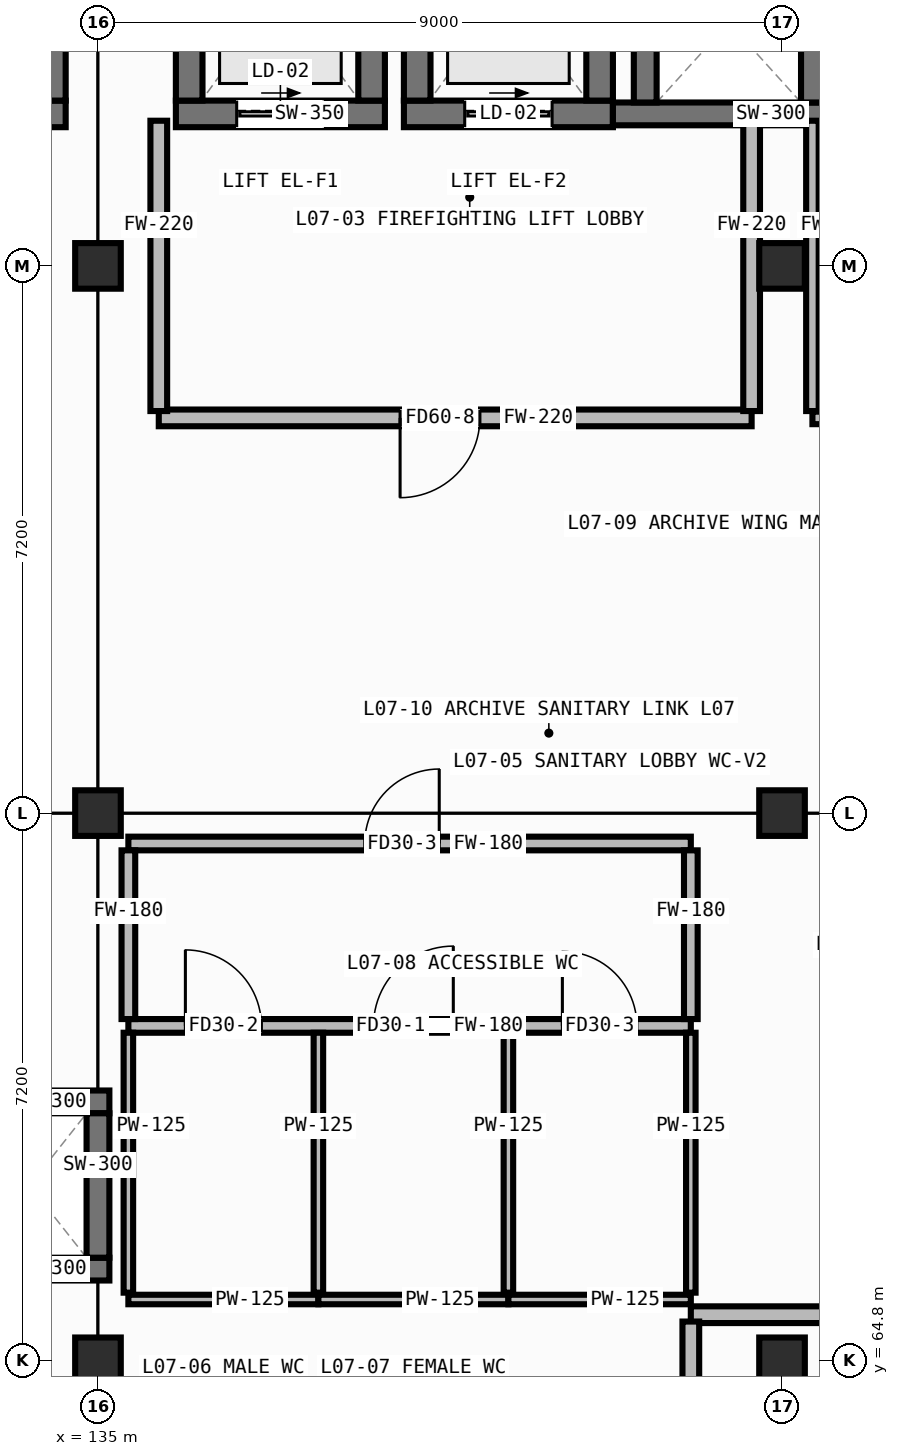
"""IFC4 building model, lengths in metres.
Left out: names, types, materials, properties, quantities, classifications, styles, units other than length and angle.
Written with IfcOpenShell. Run it as: python <this file> out.ifc"""

import sys

from ifc_helpers import new_model, si_unit, direction, frame, frame_2d, origin, origin_2d, place, context, subcontext, project, spatial, rectangle, hollow_rectangle, extrude, element, fill, save


model = new_model("IFC4")
c1 = context("Model", 3, precision=1e-05, world=origin(), true_north=direction((0.0, 1.0)))
c2 = subcontext(c1, "Body", "Model", "MODEL_VIEW")
j1 = project(units=[si_unit("LENGTHUNIT", "METRE"), si_unit("PLANEANGLEUNIT", "RADIAN")], contexts=[c1])
p1 = place(None, origin())
s1 = spatial("IfcSite", under=j1, at=p1, CompositionType="ELEMENT")
p2 = place(p1, origin())
s2 = spatial("IfcBuilding", under=s1, at=p2, CompositionType="ELEMENT")
p3 = place(p2, frame((0.0, 0.0, 24.2)))
s3 = spatial("IfcBuildingStorey", under=s2, at=p3, CompositionType="ELEMENT", Elevation=24.2)
for number, where, z_axis, x_axis in (
    (1, (135.0, 64.8, 0.0), (0.0, 0.0, 1.0), (1.0, 0.0, 0.0)),
    (2, (135.0, 72.0, 0.0), (0.0, 0.0, 1.0), (1.0, 0.0, 0.0)),
    (3, (135.0, 79.2, 0.0), (0.0, 0.0, 1.0), (1.0, 0.0, 0.0)),
    (4, (144.0, 64.8, 0.0), (0.0, 0.0, 1.0), (1.0, 0.0, 0.0)),
    (5, (144.0, 72.0, 0.0), (0.0, 0.0, 1.0), (1.0, 0.0, 0.0)),
    (6, (144.0, 79.2, 0.0), (0.0, 0.0, 1.0), (1.0, 0.0, 0.0)),
):
    element("IfcColumn", number, at=place(p3, frame(where, z_axis=z_axis, x_axis=x_axis)), inside=s3, PredefinedType="COLUMN", context=c2, shape_type="SweptSolid", body=[
        extrude(hollow_rectangle(XDim=0.6, YDim=0.6, WallThickness=0.025, at=origin_2d()), origin(), (0.0, 0.0, 1.0), 3.6),
    ])
p4 = place(p3, frame((126.425, 81.2, 0.0), z_axis=(0.0, 0.0, 1.0), x_axis=(1.0, 0.0, 0.0)))
e7 = element("IfcWall", 7, at=p4, inside=s3, PredefinedType="SHEAR", context=c2, shape_type="SweptSolid", body=[
    extrude(rectangle(XDim=8.15, YDim=0.35, at=frame_2d((4.075, 0.0))), origin(), (0.0, 0.0, 1.0), 3.32),
])
p5 = place(p4, frame((0.525, 0.0, 0.0)))
e8 = element("IfcOpeningElement", 8, at=p5, cuts=e7, PredefinedType="OPENING", context=c2, shape_type="SweptSolid", body=[
    extrude(rectangle(XDim=1.15, YDim=2.1, at=frame_2d((0.575, 1.05))), frame((0.0, 0.187, 0.0), z_axis=(0.0, -1.0, 0.0), x_axis=(1.0, 0.0, 0.0)), (0.0, 0.0, 1.0), 0.374),
])
p6 = place(p3, frame((134.4, 81.375, 0.0), z_axis=(0.0, 0.0, 1.0), x_axis=(0.0, 1.0, 0.0)))
e9 = element("IfcWall", 9, at=p6, inside=s3, PredefinedType="SHEAR", context=c2, shape_type="SweptSolid", body=[
    extrude(rectangle(XDim=3.55, YDim=0.35, at=frame_2d((1.775, 0.0))), origin(), (0.0, 0.0, 1.0), 3.32),
])
p7 = place(p3, frame((136.025, 81.2, 0.0), z_axis=(0.0, 0.0, 1.0), x_axis=(1.0, 0.0, 0.0)))
e10 = element("IfcWall", 10, at=p7, inside=s3, PredefinedType="SHEAR", context=c2, shape_type="SweptSolid", body=[
    extrude(rectangle(XDim=2.75, YDim=0.35, at=frame_2d((1.375, 0.0))), origin(), (0.0, 0.0, 1.0), 3.32),
])
p8 = place(p7, frame((0.8, 0.0, 0.0)))
e11 = element("IfcOpeningElement", 11, at=p8, cuts=e10, PredefinedType="OPENING", context=c2, shape_type="SweptSolid", body=[
    extrude(rectangle(XDim=1.15, YDim=2.12, at=frame_2d((0.575, 1.06))), frame((0.0, 0.187, 0.0), z_axis=(0.0, -1.0, 0.0), x_axis=(1.0, 0.0, 0.0)), (0.0, 0.0, 1.0), 0.374),
])
for number, where, z_axis, x_axis in (
    (12, (136.2, 81.375, 0.0), (0.0, 0.0, 1.0), (0.0, 1.0, 0.0)),
    (13, (138.6, 81.375, 0.0), (0.0, 0.0, 1.0), (0.0, 1.0, 0.0)),
):
    element("IfcWall", number, at=place(p3, frame(where, z_axis=z_axis, x_axis=x_axis)), inside=s3, PredefinedType="SHEAR", context=c2, shape_type="SweptSolid", body=[
        extrude(rectangle(XDim=2.85, YDim=0.35, at=frame_2d((1.425, 0.0))), origin(), (0.0, 0.0, 1.0), 3.32),
    ])
p9 = place(p3, frame((139.025, 81.2, 0.0), z_axis=(0.0, 0.0, 1.0), x_axis=(1.0, 0.0, 0.0)))
e14 = element("IfcWall", 14, at=p9, inside=s3, PredefinedType="SHEAR", context=c2, shape_type="SweptSolid", body=[
    extrude(rectangle(XDim=2.75, YDim=0.35, at=frame_2d((1.375, 0.0))), origin(), (0.0, 0.0, 1.0), 3.32),
])
p10 = place(p9, frame((0.8, 0.0, 0.0)))
e15 = element("IfcOpeningElement", 15, at=p10, cuts=e14, PredefinedType="OPENING", context=c2, shape_type="SweptSolid", body=[
    extrude(rectangle(XDim=1.15, YDim=2.12, at=frame_2d((0.575, 1.06))), frame((0.0, 0.187, 0.0), z_axis=(0.0, -1.0, 0.0), x_axis=(1.0, 0.0, 0.0)), (0.0, 0.0, 1.0), 0.374),
])
for number, where, z_axis, x_axis in (
    (16, (139.2, 81.375, 0.0), (0.0, 0.0, 1.0), (0.0, 1.0, 0.0)),
    (17, (141.6, 81.375, 0.0), (0.0, 0.0, 1.0), (0.0, 1.0, 0.0)),
):
    element("IfcWall", number, at=place(p3, frame(where, z_axis=z_axis, x_axis=x_axis)), inside=s3, PredefinedType="SHEAR", context=c2, shape_type="SweptSolid", body=[
        extrude(rectangle(XDim=2.85, YDim=0.35, at=frame_2d((1.425, 0.0))), origin(), (0.0, 0.0, 1.0), 3.32),
    ])
p11 = place(p3, frame((141.775, 81.2, 0.0), z_axis=(0.0, 0.0, 1.0), x_axis=(1.0, 0.0, 0.0)))
e18 = element("IfcWall", 18, at=p11, inside=s3, PredefinedType="SHEAR", context=c2, shape_type="SweptSolid", body=[
    extrude(rectangle(XDim=3.25, YDim=0.3, at=frame_2d((1.625, 0.0))), origin(), (0.0, 0.0, 1.0), 3.32),
])
for number, where, z_axis, x_axis in (
    (19, (142.2, 81.35, 0.0), (0.0, 0.0, 1.0), (0.0, 1.0, 0.0)),
    (20, (144.4, 81.35, 0.0), (0.0, 0.0, 1.0), (0.0, 1.0, 0.0)),
    (21, (133.05, 66.0, 0.0), (0.0, 0.0, 1.0), (1.0, 0.0, 0.0)),
    (22, (133.05, 68.2, 0.0), (0.0, 0.0, 1.0), (1.0, 0.0, 0.0)),
):
    element("IfcWall", number, at=place(p3, frame(where, z_axis=z_axis, x_axis=x_axis)), inside=s3, PredefinedType="SHEAR", context=c2, shape_type="SweptSolid", body=[
        extrude(rectangle(XDim=2.1, YDim=0.3, at=frame_2d((1.05, 0.0))), origin(), (0.0, 0.0, 1.0), 3.32),
    ])
p12 = place(p3, frame((135.0, 66.15, 0.0), z_axis=(0.0, 0.0, 1.0), x_axis=(0.0, 1.0, 0.0)))
e23 = element("IfcWall", 23, at=p12, inside=s3, PredefinedType="SHEAR", context=c2, shape_type="SweptSolid", body=[
    extrude(rectangle(XDim=1.9, YDim=0.3, at=frame_2d((0.95, 0.0))), origin(), (0.0, 0.0, 1.0), 3.32),
])
p13 = place(p3, frame((135.8, 77.2, 0.0), z_axis=(0.0, 0.0, 1.0), x_axis=(1.0, 0.0, 0.0)))
e24 = element("IfcWall", 24, at=p13, inside=s3, PredefinedType="PARTITIONING", context=c2, shape_type="SweptSolid", body=[
    extrude(rectangle(XDim=7.8, YDim=0.22, at=frame_2d((3.9, 0.0))), origin(), (0.0, 0.0, 1.0), 3.32),
])
p14 = place(p13, frame((3.175, 0.0, 0.0)))
e25 = element("IfcOpeningElement", 25, at=p14, cuts=e24, PredefinedType="OPENING", context=c2, shape_type="SweptSolid", body=[
    extrude(rectangle(XDim=1.05, YDim=2.02, at=frame_2d((0.525, 1.01))), frame((0.0, 0.122, 0.0), z_axis=(0.0, -1.0, 0.0), x_axis=(1.0, 0.0, 0.0)), (0.0, 0.0, 1.0), 0.244),
])
for number, where, z_axis, x_axis in (
    (26, (135.8, 77.29, 0.0), (0.0, 0.0, 1.0), (0.0, 1.0, 0.0)),
    (27, (143.6, 77.29, 0.0), (0.0, 0.0, 1.0), (0.0, 1.0, 0.0)),
):
    element("IfcWall", number, at=place(p3, frame(where, z_axis=z_axis, x_axis=x_axis)), inside=s3, PredefinedType="PARTITIONING", context=c2, shape_type="SweptSolid", body=[
        extrude(rectangle(XDim=3.82, YDim=0.22, at=frame_2d((1.91, 0.0))), origin(), (0.0, 0.0, 1.0), 3.32),
    ])
p15 = place(p3, frame((144.4, 77.2, 0.0), z_axis=(0.0, 0.0, 1.0), x_axis=(1.0, 0.0, 0.0)))
e28 = element("IfcWall", 28, at=p15, inside=s3, PredefinedType="PARTITIONING", context=c2, shape_type="SweptSolid", body=[
    extrude(rectangle(XDim=8.2, YDim=0.165, at=frame_2d((4.1, 0.0))), origin(), (0.0, 0.0, 1.0), 3.32),
])
p16 = place(p15, frame((3.61, 0.0, 0.0)))
e29 = element("IfcOpeningElement", 29, at=p16, cuts=e28, PredefinedType="OPENING", context=c2, shape_type="SweptSolid", body=[
    extrude(rectangle(XDim=0.98, YDim=2.02, at=frame_2d((0.49, 1.01))), frame((0.0, 0.094, 0.0), z_axis=(0.0, -1.0, 0.0), x_axis=(1.0, 0.0, 0.0)), (0.0, 0.0, 1.0), 0.189),
])
p17 = place(p3, frame((144.4, 77.29, 0.0), z_axis=(0.0, 0.0, 1.0), x_axis=(0.0, 1.0, 0.0)))
e30 = element("IfcWall", 30, at=p17, inside=s3, PredefinedType="PARTITIONING", context=c2, shape_type="SweptSolid", body=[
    extrude(rectangle(XDim=3.82, YDim=0.165, at=frame_2d((1.91, 0.0))), origin(), (0.0, 0.0, 1.0), 3.32),
])
p18 = place(p3, frame((135.4, 69.2, 0.0), z_axis=(0.0, 0.0, 1.0), x_axis=(1.0, 0.0, 0.0)))
e31 = element("IfcWall", 31, at=p18, inside=s3, PredefinedType="PARTITIONING", context=c2, shape_type="SweptSolid", body=[
    extrude(rectangle(XDim=7.4, YDim=0.18, at=frame_2d((3.7, 0.0))), origin(), (0.0, 0.0, 1.0), 3.32),
])
p19 = place(p18, frame((0.75, 0.0, 0.0)))
e32 = element("IfcOpeningElement", 32, at=p19, cuts=e31, PredefinedType="OPENING", context=c2, shape_type="SweptSolid", body=[
    extrude(rectangle(XDim=1.0, YDim=2.08, at=frame_2d((0.5, 1.04))), frame((0.0, 0.102, 0.0), z_axis=(0.0, -1.0, 0.0), x_axis=(1.0, 0.0, 0.0)), (0.0, 0.0, 1.0), 0.204),
])
p20 = place(p18, frame((3.225, 0.0, 0.0)))
e33 = element("IfcOpeningElement", 33, at=p20, cuts=e31, PredefinedType="OPENING", context=c2, shape_type="SweptSolid", body=[
    extrude(rectangle(XDim=1.05, YDim=2.1, at=frame_2d((0.525, 1.05))), frame((0.0, 0.102, 0.0), z_axis=(0.0, -1.0, 0.0), x_axis=(1.0, 0.0, 0.0)), (0.0, 0.0, 1.0), 0.204),
])
p21 = place(p18, frame((5.71, 0.0, 0.0)))
e34 = element("IfcOpeningElement", 34, at=p21, cuts=e31, PredefinedType="OPENING", context=c2, shape_type="SweptSolid", body=[
    extrude(rectangle(XDim=0.98, YDim=2.02, at=frame_2d((0.49, 1.01))), frame((0.0, 0.102, 0.0), z_axis=(0.0, -1.0, 0.0), x_axis=(1.0, 0.0, 0.0)), (0.0, 0.0, 1.0), 0.204),
])
p22 = place(p3, frame((135.4, 71.6, 0.0), z_axis=(0.0, 0.0, 1.0), x_axis=(1.0, 0.0, 0.0)))
e35 = element("IfcWall", 35, at=p22, inside=s3, PredefinedType="PARTITIONING", context=c2, shape_type="SweptSolid", body=[
    extrude(rectangle(XDim=7.4, YDim=0.18, at=frame_2d((3.7, 0.0))), origin(), (0.0, 0.0, 1.0), 3.32),
])
p23 = place(p22, frame((3.11, 0.0, 0.0)))
e36 = element("IfcOpeningElement", 36, at=p23, cuts=e35, PredefinedType="OPENING", context=c2, shape_type="SweptSolid", body=[
    extrude(rectangle(XDim=0.98, YDim=2.02, at=frame_2d((0.49, 1.01))), frame((0.0, 0.102, 0.0), z_axis=(0.0, -1.0, 0.0), x_axis=(1.0, 0.0, 0.0)), (0.0, 0.0, 1.0), 0.204),
])
for number, where, z_axis, x_axis in (
    (37, (135.4, 69.29, 0.0), (0.0, 0.0, 1.0), (0.0, 1.0, 0.0)),
    (38, (142.8, 69.29, 0.0), (0.0, 0.0, 1.0), (0.0, 1.0, 0.0)),
):
    element("IfcWall", number, at=place(p3, frame(where, z_axis=z_axis, x_axis=x_axis)), inside=s3, PredefinedType="PARTITIONING", context=c2, shape_type="SweptSolid", body=[
        extrude(rectangle(XDim=2.22, YDim=0.18, at=frame_2d((1.11, 0.0))), origin(), (0.0, 0.0, 1.0), 3.32),
    ])
p24 = place(p3, frame((135.4, 65.6, 0.0), z_axis=(0.0, 0.0, 1.0), x_axis=(1.0, 0.0, 0.0)))
e39 = element("IfcWall", 39, at=p24, inside=s3, PredefinedType="PARTITIONING", context=c2, shape_type="SweptSolid", body=[
    extrude(rectangle(XDim=2.5, YDim=0.125, at=frame_2d((1.25, 0.0))), origin(), (0.0, 0.0, 1.0), 3.32),
])
for number, where, z_axis, x_axis in (
    (40, (135.4, 65.69, 0.0), (0.0, 0.0, 1.0), (0.0, 1.0, 0.0)),
    (41, (137.9, 65.69, 0.0), (0.0, 0.0, 1.0), (0.0, 1.0, 0.0)),
):
    element("IfcWall", number, at=place(p3, frame(where, z_axis=z_axis, x_axis=x_axis)), inside=s3, PredefinedType="PARTITIONING", context=c2, shape_type="SweptSolid", body=[
        extrude(rectangle(XDim=3.42, YDim=0.125, at=frame_2d((1.71, 0.0))), origin(), (0.0, 0.0, 1.0), 3.32),
    ])
p25 = place(p3, frame((137.9, 65.6, 0.0), z_axis=(0.0, 0.0, 1.0), x_axis=(1.0, 0.0, 0.0)))
e42 = element("IfcWall", 42, at=p25, inside=s3, PredefinedType="PARTITIONING", context=c2, shape_type="SweptSolid", body=[
    extrude(rectangle(XDim=2.5, YDim=0.125, at=frame_2d((1.25, 0.0))), origin(), (0.0, 0.0, 1.0), 3.32),
])
p26 = place(p3, frame((140.4, 65.69, 0.0), z_axis=(0.0, 0.0, 1.0), x_axis=(0.0, 1.0, 0.0)))
e43 = element("IfcWall", 43, at=p26, inside=s3, PredefinedType="PARTITIONING", context=c2, shape_type="SweptSolid", body=[
    extrude(rectangle(XDim=3.42, YDim=0.125, at=frame_2d((1.71, 0.0))), origin(), (0.0, 0.0, 1.0), 3.32),
])
p27 = place(p3, frame((140.4, 65.6, 0.0), z_axis=(0.0, 0.0, 1.0), x_axis=(1.0, 0.0, 0.0)))
e44 = element("IfcWall", 44, at=p27, inside=s3, PredefinedType="PARTITIONING", context=c2, shape_type="SweptSolid", body=[
    extrude(rectangle(XDim=2.4, YDim=0.125, at=frame_2d((1.2, 0.0))), origin(), (0.0, 0.0, 1.0), 3.32),
])
p28 = place(p3, frame((142.8, 65.69, 0.0), z_axis=(0.0, 0.0, 1.0), x_axis=(0.0, 1.0, 0.0)))
e45 = element("IfcWall", 45, at=p28, inside=s3, PredefinedType="PARTITIONING", context=c2, shape_type="SweptSolid", body=[
    extrude(rectangle(XDim=3.42, YDim=0.125, at=frame_2d((1.71, 0.0))), origin(), (0.0, 0.0, 1.0), 3.32),
])
p29 = place(p3, frame((142.8, 65.4, 0.0), z_axis=(0.0, 0.0, 1.0), x_axis=(1.0, 0.0, 0.0)))
e46 = element("IfcWall", 46, at=p29, inside=s3, PredefinedType="PARTITIONING", context=c2, shape_type="SweptSolid", body=[
    extrude(rectangle(XDim=11.2, YDim=0.22, at=frame_2d((5.6, 0.0))), origin(), (0.0, 0.0, 1.0), 3.32),
])
p30 = place(p29, frame((4.825, 0.0, 0.0)))
e47 = element("IfcOpeningElement", 47, at=p30, cuts=e46, PredefinedType="OPENING", context=c2, shape_type="SweptSolid", body=[
    extrude(rectangle(XDim=1.75, YDim=2.12, at=frame_2d((0.875, 1.06))), frame((0.0, 0.122, 0.0), z_axis=(0.0, -1.0, 0.0), x_axis=(1.0, 0.0, 0.0)), (0.0, 0.0, 1.0), 0.244),
])
p31 = place(p3, frame((142.8, 57.735, 0.0), z_axis=(0.0, 0.0, 1.0), x_axis=(0.0, 1.0, 0.0)))
e48 = element("IfcWall", 48, at=p31, inside=s3, PredefinedType="PARTITIONING", context=c2, shape_type="SweptSolid", body=[
    extrude(rectangle(XDim=7.575, YDim=0.22, at=frame_2d((3.788, 0.0))), origin(), (0.0, 0.0, 1.0), 3.32),
])
p32 = place(p8, origin())
e49 = element("IfcDoor", 49, at=p32, inside=s3, OperationType="SLIDING_TO_LEFT", PredefinedType="DOOR", context=c2, shape_type="SweptSolid", body=[
    extrude(rectangle(XDim=1.15, YDim=2.12, at=frame_2d((0.575, 1.06))), frame((0.0, 0.025, 0.0), z_axis=(0.0, -1.0, 0.0), x_axis=(1.0, 0.0, 0.0)), (0.0, 0.0, 1.0), 0.05),
])
fill(e11, e49)
p33 = place(p10, origin())
e50 = element("IfcDoor", 50, at=p33, inside=s3, OperationType="SLIDING_TO_LEFT", PredefinedType="DOOR", context=c2, shape_type="SweptSolid", body=[
    extrude(rectangle(XDim=1.15, YDim=2.12, at=frame_2d((0.575, 1.06))), frame((0.0, 0.025, 0.0), z_axis=(0.0, -1.0, 0.0), x_axis=(1.0, 0.0, 0.0)), (0.0, 0.0, 1.0), 0.05),
])
fill(e15, e50)
p34 = place(p14, frame((1.05, 0.0, 0.0), z_axis=(0.0, 0.0, 1.0), x_axis=(-1.0, 0.0, 0.0)))
e51 = element("IfcDoor", 51, at=p34, inside=s3, OperationType="SINGLE_SWING_RIGHT", PredefinedType="DOOR", context=c2, shape_type="SweptSolid", body=[
    extrude(rectangle(XDim=1.05, YDim=2.02, at=frame_2d((0.525, 1.01))), frame((0.0, 0.025, 0.0), z_axis=(0.0, -1.0, 0.0), x_axis=(1.0, 0.0, 0.0)), (0.0, 0.0, 1.0), 0.05),
])
fill(e25, e51)
p35 = place(p23, origin())
e52 = element("IfcDoor", 52, at=p35, inside=s3, OperationType="SINGLE_SWING_RIGHT", PredefinedType="DOOR", context=c2, shape_type="SweptSolid", body=[
    extrude(rectangle(XDim=0.98, YDim=2.02, at=frame_2d((0.49, 1.01))), frame((0.0, 0.025, 0.0), z_axis=(0.0, -1.0, 0.0), x_axis=(1.0, 0.0, 0.0)), (0.0, 0.0, 1.0), 0.05),
])
fill(e36, e52)
p36 = place(p19, origin())
e53 = element("IfcDoor", 53, at=p36, inside=s3, OperationType="SINGLE_SWING_LEFT", PredefinedType="DOOR", context=c2, shape_type="SweptSolid", body=[
    extrude(rectangle(XDim=1.0, YDim=2.08, at=frame_2d((0.5, 1.04))), frame((0.0, 0.025, 0.0), z_axis=(0.0, -1.0, 0.0), x_axis=(1.0, 0.0, 0.0)), (0.0, 0.0, 1.0), 0.05),
])
fill(e32, e53)
p37 = place(p20, origin())
e54 = element("IfcDoor", 54, at=p37, inside=s3, OperationType="SINGLE_SWING_RIGHT", PredefinedType="DOOR", context=c2, shape_type="SweptSolid", body=[
    extrude(rectangle(XDim=1.05, YDim=2.1, at=frame_2d((0.525, 1.05))), frame((0.0, 0.025, 0.0), z_axis=(0.0, -1.0, 0.0), x_axis=(1.0, 0.0, 0.0)), (0.0, 0.0, 1.0), 0.05),
])
fill(e33, e54)
p38 = place(p21, origin())
e55 = element("IfcDoor", 55, at=p38, inside=s3, OperationType="SINGLE_SWING_LEFT", PredefinedType="DOOR", context=c2, shape_type="SweptSolid", body=[
    extrude(rectangle(XDim=0.98, YDim=2.02, at=frame_2d((0.49, 1.01))), frame((0.0, 0.025, 0.0), z_axis=(0.0, -1.0, 0.0), x_axis=(1.0, 0.0, 0.0)), (0.0, 0.0, 1.0), 0.05),
])
fill(e34, e55)
save(model, sys.argv[1])
